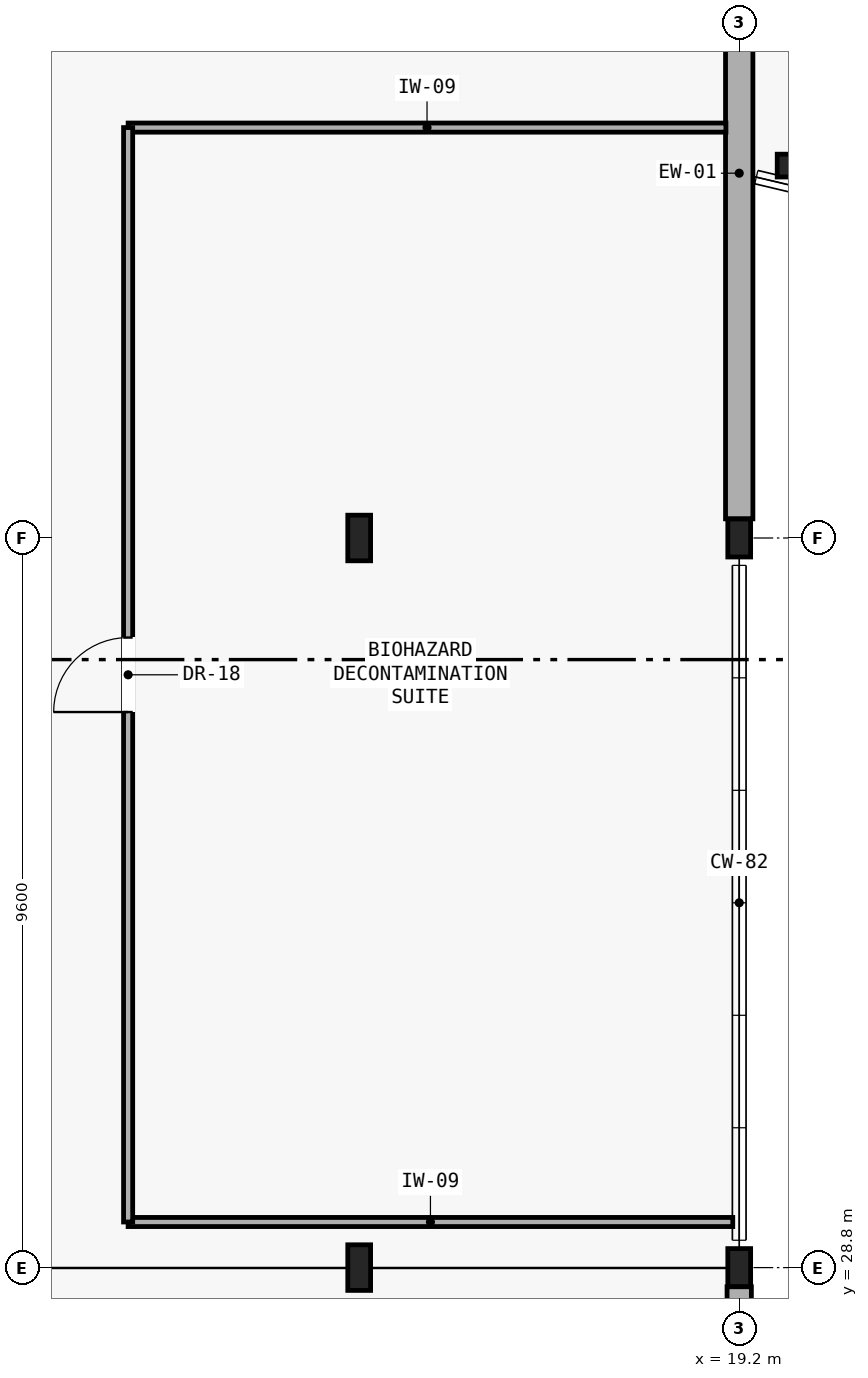
"""IFC4 building model, lengths in metres.
Left out: names, types, materials, properties, quantities, classifications, styles, units other than length and angle.
Written with IfcOpenShell. Run it as: python <this file> out.ifc"""

import sys

from ifc_helpers import new_model, si_unit, direction, frame, frame_2d, origin, origin_2d, place, context, subcontext, project, spatial, rectangle, i_section, extrude, element, fill, save


model = new_model("IFC4")
c1 = context("Model", 3, precision=1e-05, world=origin(), true_north=direction((0.0, 1.0)))
c2 = subcontext(c1, "Body", "Model", "MODEL_VIEW")
j1 = project(units=[si_unit("LENGTHUNIT", "METRE"), si_unit("PLANEANGLEUNIT", "RADIAN")], contexts=[c1])
p1 = place(None, origin())
s1 = spatial("IfcSite", under=j1, at=p1, CompositionType="ELEMENT")
p2 = place(p1, origin())
s2 = spatial("IfcBuilding", under=s1, at=p2, CompositionType="ELEMENT")
p3 = place(p2, origin())
s3 = spatial("IfcBuildingStorey", under=s2, at=p3, CompositionType="ELEMENT", Elevation=0.0)
p4 = place(p3, frame((19.85, 43.3, 0.0), z_axis=(0.0, 0.0, 1.0), x_axis=(1.0, 0.0, 0.0)))
e1 = element("IfcColumn", 1, at=p4, inside=s3, PredefinedType="COLUMN", context=c2, shape_type="SweptSolid", body=[
    extrude(i_section(OverallWidth=0.3, OverallDepth=0.3, WebThickness=0.011, FlangeThickness=0.019, FilletRadius=0.027, at=origin_2d()), origin(), (0.0, 0.0, 1.0), 5.25),
])
p5 = place(p3, frame((19.2, 28.8, 0.0), z_axis=(0.0, 0.0, 1.0), x_axis=(1.0, 0.0, 0.0)))
e2 = element("IfcColumn", 2, at=p5, inside=s3, PredefinedType="COLUMN", context=c2, shape_type="SweptSolid", body=[
    extrude(i_section(OverallWidth=0.3, OverallDepth=0.5, WebThickness=0.014, FlangeThickness=0.028, FilletRadius=0.027, at=origin_2d()), origin(), (0.0, 0.0, 1.0), 5.25),
])
p6 = place(p3, frame((14.2, 28.8, 0.0), z_axis=(0.0, 0.0, 1.0), x_axis=(1.0, 0.0, 0.0)))
e3 = element("IfcColumn", 3, at=p6, inside=s3, PredefinedType="COLUMN", context=c2, shape_type="SweptSolid", body=[
    extrude(i_section(OverallWidth=0.3, OverallDepth=0.6, WebThickness=0.015, FlangeThickness=0.03, FilletRadius=0.027, at=origin_2d()), origin(), (0.0, 0.0, 1.0), 5.25),
])
p7 = place(p3, frame((19.2, 38.4, 0.0), z_axis=(0.0, 0.0, 1.0), x_axis=(1.0, 0.0, 0.0)))
e4 = element("IfcColumn", 4, at=p7, inside=s3, PredefinedType="COLUMN", context=c2, shape_type="SweptSolid", body=[
    extrude(i_section(OverallWidth=0.3, OverallDepth=0.5, WebThickness=0.014, FlangeThickness=0.028, FilletRadius=0.027, at=origin_2d()), origin(), (0.0, 0.0, 1.0), 5.25),
])
p8 = place(p3, frame((14.2, 38.4, 0.0), z_axis=(0.0, 0.0, 1.0), x_axis=(1.0, 0.0, 0.0)))
e5 = element("IfcColumn", 5, at=p8, inside=s3, PredefinedType="COLUMN", context=c2, shape_type="SweptSolid", body=[
    extrude(i_section(OverallWidth=0.3, OverallDepth=0.6, WebThickness=0.015, FlangeThickness=0.03, FilletRadius=0.027, at=origin_2d()), origin(), (0.0, 0.0, 1.0), 5.25),
])
p9 = place(p3, frame((19.2, 38.652, 0.0), z_axis=(0.0, 0.0, 1.0), x_axis=(0.0, 1.0, 0.0)))
e6 = element("IfcWall", 6, at=p9, inside=s3, PredefinedType="SOLIDWALL", context=c2, shape_type="SweptSolid", body=[
    extrude(rectangle(XDim=9.096, YDim=0.36, at=frame_2d((4.548, 0.0))), origin(), (0.0, 0.0, 1.0), 4.54),
])
p10 = place(p9, frame((6.348, 0.0, 0.0)))
e7 = element("IfcOpeningElement", 7, at=p10, cuts=e6, PredefinedType="OPENING", context=c2, shape_type="SweptSolid", body=[
    extrude(rectangle(XDim=1.5, YDim=2.2, at=frame_2d((0.75, 1.1))), frame((0.0, 0.19, 0.0), z_axis=(0.0, -1.0, 0.0), x_axis=(1.0, 0.0, 0.0)), (0.0, 0.0, 1.0), 0.38),
])
p11 = place(p3, frame((19.2, 27.402, 0.0), z_axis=(0.0, 0.0, 1.0), x_axis=(0.0, 1.0, 0.0)))
e8 = element("IfcWall", 8, at=p11, inside=s3, PredefinedType="SOLIDWALL", context=c2, shape_type="SweptSolid", body=[
    extrude(rectangle(XDim=1.146, YDim=0.32, at=frame_2d((0.573, 0.0))), origin(), (0.0, 0.0, 1.0), 4.95),
])
p12 = place(p3, frame((11.16, 29.4, 0.0), z_axis=(0.0, 0.0, 1.0), x_axis=(1.0, 0.0, 0.0)))
e9 = element("IfcWall", 9, at=p12, inside=s3, PredefinedType="PARTITIONING", context=c2, shape_type="SweptSolid", body=[
    extrude(rectangle(XDim=7.955, YDim=0.12, at=frame_2d((3.978, 0.0))), origin(), (0.0, 0.0, 1.0), 5.0),
])
p13 = place(p3, frame((19.025, 43.8, 0.0), z_axis=(0.0, 0.0, 1.0), x_axis=(-1.0, 0.0, 0.0)))
e10 = element("IfcWall", 10, at=p13, inside=s3, PredefinedType="PARTITIONING", context=c2, shape_type="SweptSolid", body=[
    extrude(rectangle(XDim=7.865, YDim=0.12, at=frame_2d((3.933, 0.0))), origin(), (0.0, 0.0, 1.0), 5.0),
])
p14 = place(p3, frame((11.16, 43.8, 0.0), z_axis=(0.0, 0.0, 1.0), x_axis=(0.0, -1.0, 0.0)))
e11 = element("IfcWall", 11, at=p14, inside=s3, PredefinedType="PARTITIONING", context=c2, shape_type="SweptSolid", body=[
    extrude(rectangle(XDim=14.4, YDim=0.12, at=frame_2d((7.2, 0.0))), origin(), (0.0, 0.0, 1.0), 4.62),
])
p15 = place(p14, frame((6.71, 0.0, 0.0)))
e12 = element("IfcOpeningElement", 12, at=p15, cuts=e11, PredefinedType="OPENING", context=c2, shape_type="SweptSolid", body=[
    extrude(rectangle(XDim=0.98, YDim=2.1, at=frame_2d((0.49, 1.05))), frame((0.0, 0.07, 0.0), z_axis=(0.0, -1.0, 0.0), x_axis=(1.0, 0.0, 0.0)), (0.0, 0.0, 1.0), 0.14),
])
p16 = place(p15, frame((0.98, 0.0, 0.0), z_axis=(0.0, 0.0, 1.0), x_axis=(-1.0, 0.0, 0.0)))
e13 = element("IfcDoor", 13, at=p16, inside=s3, OperationType="SINGLE_SWING_RIGHT", PredefinedType="DOOR", context=c2, shape_type="SweptSolid", body=[
    extrude(rectangle(XDim=0.98, YDim=2.1, at=frame_2d((0.49, 1.05))), frame((0.0, 0.025, 0.0), z_axis=(0.0, -1.0, 0.0), x_axis=(1.0, 0.0, 0.0)), (0.0, 0.0, 1.0), 0.05),
])
fill(e12, e13)
save(model, sys.argv[1])
